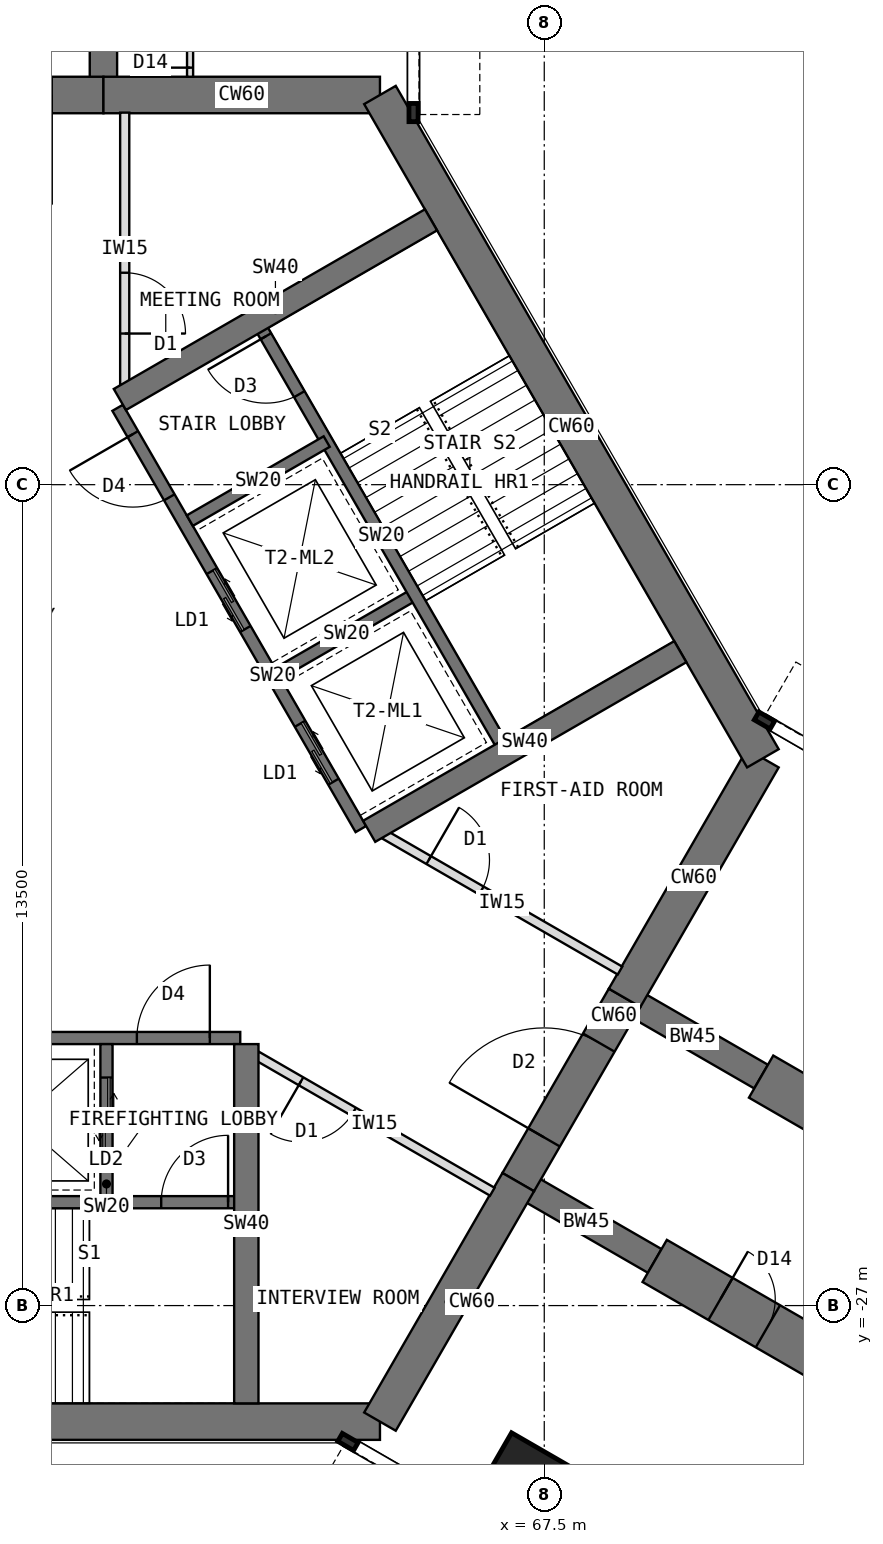
"""IFC4 building model, lengths in metres.
Left out: names, types, materials, properties, quantities, classifications, styles, units other than length and angle.
Written with IfcOpenShell. Run it as: python <this file> out.ifc"""

import sys

from ifc_helpers import new_model, si_unit, direction, frame, frame_2d, origin, origin_2d, place, context, subcontext, project, spatial, rectangle, extrude, element, fill, save


model = new_model("IFC4")
c1 = context("Model", 3, precision=1e-05, world=origin(), true_north=direction((0.0, 1.0)))
c2 = subcontext(c1, "Body", "Model", "MODEL_VIEW")
j1 = project(units=[si_unit("LENGTHUNIT", "METRE"), si_unit("PLANEANGLEUNIT", "RADIAN")], contexts=[c1])
p1 = place(None, origin())
s1 = spatial("IfcSite", under=j1, at=p1, CompositionType="ELEMENT")
p2 = place(p1, origin())
s2 = spatial("IfcBuilding", under=s1, at=p2, CompositionType="ELEMENT")
p3 = place(p2, frame((0.0, 0.0, 157.5)))
s3 = spatial("IfcBuildingStorey", under=s2, at=p3, CompositionType="ELEMENT", Elevation=157.5)
p4 = place(p3, frame((64.798, -7.092, 0.0), z_axis=(0.0, 0.0, 1.0), x_axis=(-1.0, 0.0, 0.0)))
e1 = element("IfcWall", 1, at=p4, inside=s3, PredefinedType="SHEAR", context=c2, shape_type="SweptSolid", body=[
    extrude(rectangle(XDim=4.548, YDim=0.6, at=frame_2d((2.274, 0.0))), origin(), (0.0, 0.0, 1.0), 4.0),
])
p5 = place(p3, frame((60.25, -7.092, 0.0), z_axis=(0.0, 0.0, 1.0), x_axis=(-1.0, 0.0, 0.0)))
e2 = element("IfcWall", 2, at=p5, inside=s3, PredefinedType="SHEAR", context=c2, shape_type="SweptSolid", body=[
    extrude(rectangle(XDim=3.5, YDim=0.6, at=frame_2d((1.75, 0.0))), origin(), (0.0, 0.0, 1.0), 4.0),
])
p6 = place(p5, frame((0.85, 0.0, 0.0)))
e3 = element("IfcOpeningElement", 3, at=p6, cuts=e2, PredefinedType="OPENING", context=c2, shape_type="SweptSolid", body=[
    extrude(rectangle(XDim=1.8, YDim=2.1, at=frame_2d((0.9, 1.05))), frame((0.0, 0.31, 0.0), z_axis=(0.0, -1.0, 0.0), x_axis=(1.0, 0.0, 0.0)), (0.0, 0.0, 1.0), 0.62),
])
p7 = place(p3, frame((52.202, -28.908, 0.0), z_axis=(0.0, 0.0, 1.0), x_axis=(1.0, 0.0, 0.0)))
e4 = element("IfcWall", 4, at=p7, inside=s3, PredefinedType="SHEAR", context=c2, shape_type="SweptSolid", body=[
    extrude(rectangle(XDim=12.596, YDim=0.6, at=frame_2d((6.298, 0.0))), origin(), (0.0, 0.0, 1.0), 4.0),
])
p8 = place(p3, frame((64.798, -28.908, 0.0), z_axis=(0.0, 0.0, 1.0), x_axis=(0.499984222037, 0.866034513004, 0.0)))
e5 = element("IfcWall", 5, at=p8, inside=s3, PredefinedType="SHEAR", context=c2, shape_type="SweptSolid", body=[
    extrude(rectangle(XDim=4.548, YDim=0.6, at=frame_2d((2.274, 0.0))), origin(), (0.0, 0.0, 1.0), 4.0),
])
p9 = place(p3, frame((67.072, -24.97, 0.0), z_axis=(0.0, 0.0, 1.0), x_axis=(0.500010275428, 0.866019471182, 0.0)))
e6 = element("IfcWall", 6, at=p9, inside=s3, PredefinedType="SHEAR", context=c2, shape_type="SweptSolid", body=[
    extrude(rectangle(XDim=3.5, YDim=0.6, at=frame_2d((1.75, 0.0))), origin(), (0.0, 0.0, 1.0), 4.0),
])
p10 = place(p9, frame((0.85, 0.0, 0.0)))
e7 = element("IfcOpeningElement", 7, at=p10, cuts=e6, PredefinedType="OPENING", context=c2, shape_type="SweptSolid", body=[
    extrude(rectangle(XDim=1.8, YDim=2.1, at=frame_2d((0.9, 1.05))), frame((0.0, 0.31, 0.0), z_axis=(0.0, -1.0, 0.0), x_axis=(1.0, 0.0, 0.0)), (0.0, 0.0, 1.0), 0.62),
])
p11 = place(p3, frame((68.822, -21.939, 0.0), z_axis=(0.0, 0.0, 1.0), x_axis=(0.500024481964, 0.866011268655, 0.0)))
e8 = element("IfcWall", 8, at=p11, inside=s3, PredefinedType="SHEAR", context=c2, shape_type="SweptSolid", body=[
    extrude(rectangle(XDim=4.548, YDim=0.6, at=frame_2d((2.274, 0.0))), origin(), (0.0, 0.0, 1.0), 4.0),
])
p12 = place(p3, frame((71.096, -18.0, 0.0), z_axis=(0.0, 0.0, 1.0), x_axis=(-0.500005998175, 0.866021940709, 0.0)))
e9 = element("IfcWall", 9, at=p12, inside=s3, PredefinedType="SHEAR", context=c2, shape_type="SweptSolid", body=[
    extrude(rectangle(XDim=12.596, YDim=0.6, at=frame_2d((6.298, 0.0))), origin(), (0.0, 0.0, 1.0), 4.0),
])
p13 = place(p3, frame((60.25, -7.092, 0.0), z_axis=(0.0, 0.0, 1.0), x_axis=(0.0, 1.0, 0.0)))
e10 = element("IfcWall", 10, at=p13, inside=s3, PredefinedType="SHEAR", context=c2, shape_type="SweptSolid", body=[
    extrude(rectangle(XDim=2.592, YDim=0.45, at=frame_2d((1.296, 0.0))), origin(), (0.0, 0.0, 1.0), 4.0),
])
p14 = place(p3, frame((68.822, -21.939, 0.0), z_axis=(0.0, 0.0, 1.0), x_axis=(0.866072649678, -0.499918158782, 0.0)))
e11 = element("IfcWall", 11, at=p14, inside=s3, PredefinedType="SHEAR", context=c2, shape_type="SweptSolid", body=[
    extrude(rectangle(XDim=2.592, YDim=0.45, at=frame_2d((1.296, 0.0))), origin(), (0.0, 0.0, 1.0), 4.0),
])
p15 = place(p3, frame((71.066, -23.234, 0.0), z_axis=(0.0, 0.0, 1.0), x_axis=(0.86602681393, -0.499997557548, 0.0)))
e12 = element("IfcWall", 12, at=p15, inside=s3, PredefinedType="SHEAR", context=c2, shape_type="SweptSolid", body=[
    extrude(rectangle(XDim=9.5, YDim=0.8, at=frame_2d((4.75, 0.0))), origin(), (0.0, 0.0, 1.0), 4.0),
])
p16 = place(p15, frame((1.25, 0.0, 0.0)))
e13 = element("IfcOpeningElement", 13, at=p16, cuts=e12, PredefinedType="OPENING", context=c2, shape_type="SweptSolid", body=[
    extrude(rectangle(XDim=0.9, YDim=2.1, at=frame_2d((0.45, 1.05))), frame((0.0, 0.41, 0.0), z_axis=(0.0, -1.0, 0.0), x_axis=(1.0, 0.0, 0.0)), (0.0, 0.0, 1.0), 0.82),
])
p17 = place(p3, frame((67.072, -24.97, 0.0), z_axis=(0.0, 0.0, 1.0), x_axis=(0.866031863473, -0.499988811324, 0.0)))
e14 = element("IfcWall", 14, at=p17, inside=s3, PredefinedType="SHEAR", context=c2, shape_type="SweptSolid", body=[
    extrude(rectangle(XDim=2.592, YDim=0.45, at=frame_2d((1.296, 0.0))), origin(), (0.0, 0.0, 1.0), 4.0),
])
p18 = place(p3, frame((69.316, -26.266, 0.0), z_axis=(0.0, 0.0, 1.0), x_axis=(0.86602681393, -0.499997557548, 0.0)))
e15 = element("IfcWall", 15, at=p18, inside=s3, PredefinedType="SHEAR", context=c2, shape_type="SweptSolid", body=[
    extrude(rectangle(XDim=9.5, YDim=0.8, at=frame_2d((4.75, 0.0))), origin(), (0.0, 0.0, 1.0), 4.0),
])
p19 = place(p18, frame((1.25, 0.0, 0.0)))
e16 = element("IfcOpeningElement", 16, at=p19, cuts=e15, PredefinedType="OPENING", context=c2, shape_type="SweptSolid", body=[
    extrude(rectangle(XDim=0.9, YDim=2.1, at=frame_2d((0.45, 1.05))), frame((0.0, 0.41, 0.0), z_axis=(0.0, -1.0, 0.0), x_axis=(1.0, 0.0, 0.0)), (0.0, 0.0, 1.0), 0.82),
])
p20 = place(p3, frame((67.191, -29.946, 0.0), z_axis=(0.0, 0.0, 1.0), x_axis=(0.5, 0.866025403784, 0.0)))
e17 = element("IfcColumn", 17, at=p20, inside=s3, PredefinedType="COLUMN", context=c2, shape_type="SweptSolid", body=[
    extrude(rectangle(XDim=1.25, YDim=1.25, at=origin_2d()), origin(), (0.0, 0.0, 1.0), 4.0),
])
p21 = place(p3, frame((54.5, -22.6, 0.0), z_axis=(0.0, 0.0, 1.0), x_axis=(1.0, 0.0, 0.0)))
e18 = element("IfcWall", 18, at=p21, inside=s3, PredefinedType="SHEAR", context=c2, shape_type="SweptSolid", body=[
    extrude(rectangle(XDim=8.0, YDim=0.2, at=frame_2d((4.0, 0.0))), origin(), (0.0, 0.0, 1.0), 4.0),
])
p22 = place(p21, frame((6.3, 0.0, 0.0)))
e19 = element("IfcOpeningElement", 19, at=p22, cuts=e18, PredefinedType="OPENING", context=c2, shape_type="SweptSolid", body=[
    extrude(rectangle(XDim=1.2, YDim=2.1, at=frame_2d((0.6, 1.05))), frame((0.0, 0.11, 0.0), z_axis=(0.0, -1.0, 0.0), x_axis=(1.0, 0.0, 0.0)), (0.0, 0.0, 1.0), 0.22),
])
p23 = place(p21, frame((0.9, 0.0, 0.0)))
e20 = element("IfcOpeningElement", 20, at=p23, cuts=e18, PredefinedType="OPENING", context=c2, shape_type="SweptSolid", body=[
    extrude(rectangle(XDim=1.1, YDim=2.2, at=frame_2d((0.55, 1.1))), frame((0.0, 0.11, 0.0), z_axis=(0.0, -1.0, 0.0), x_axis=(1.0, 0.0, 0.0)), (0.0, 0.0, 1.0), 0.22),
])
p24 = place(p3, frame((60.3, -22.7, 0.0), z_axis=(0.0, 0.0, 1.0), x_axis=(0.0, -1.0, 0.0)))
e21 = element("IfcWall", 21, at=p24, inside=s3, PredefinedType="SHEAR", context=c2, shape_type="SweptSolid", body=[
    extrude(rectangle(XDim=2.6, YDim=0.2, at=frame_2d((1.3, 0.0))), origin(), (0.0, 0.0, 1.0), 4.0),
])
p25 = place(p24, frame((0.55, 0.0, 0.0)))
e22 = element("IfcOpeningElement", 22, at=p25, cuts=e21, PredefinedType="OPENING", context=c2, shape_type="SweptSolid", body=[
    extrude(rectangle(XDim=1.3, YDim=2.2, at=frame_2d((0.65, 1.1))), frame((0.0, 0.11, 0.0), z_axis=(0.0, -1.0, 0.0), x_axis=(1.0, 0.0, 0.0)), (0.0, 0.0, 1.0), 0.22),
])
p26 = place(p3, frame((54.5, -25.3, 0.0), z_axis=(0.0, 0.0, 1.0), x_axis=(1.0, 0.0, 0.0)))
e23 = element("IfcWall", 23, at=p26, inside=s3, PredefinedType="SHEAR", context=c2, shape_type="SweptSolid", body=[
    extrude(rectangle(XDim=8.0, YDim=0.2, at=frame_2d((4.0, 0.0))), origin(), (0.0, 0.0, 1.0), 4.0),
])
p27 = place(p26, frame((6.7, 0.0, 0.0)))
e24 = element("IfcOpeningElement", 24, at=p27, cuts=e23, PredefinedType="OPENING", context=c2, shape_type="SweptSolid", body=[
    extrude(rectangle(XDim=1.1, YDim=2.1, at=frame_2d((0.55, 1.05))), frame((0.0, 0.11, 0.0), z_axis=(0.0, -1.0, 0.0), x_axis=(1.0, 0.0, 0.0)), (0.0, 0.0, 1.0), 0.22),
])
p28 = place(p3, frame((62.6, -22.7, 0.0), z_axis=(0.0, 0.0, 1.0), x_axis=(0.0, -1.0, 0.0)))
e25 = element("IfcWall", 25, at=p28, inside=s3, PredefinedType="SHEAR", context=c2, shape_type="SweptSolid", body=[
    extrude(rectangle(XDim=5.908, YDim=0.4, at=frame_2d((2.954, 0.0))), origin(), (0.0, 0.0, 1.0), 4.0),
])
p29 = place(p3, frame((64.484, -19.164, 0.0), z_axis=(0.0, 0.0, 1.0), x_axis=(-0.49999894854, 0.866026010844, 0.0)))
e26 = element("IfcWall", 26, at=p29, inside=s3, PredefinedType="SHEAR", context=c2, shape_type="SweptSolid", body=[
    extrude(rectangle(XDim=8.0, YDim=0.2, at=frame_2d((4.0, 0.0))), origin(), (0.0, 0.0, 1.0), 4.0),
])
p30 = place(p29, frame((6.3, 0.0, 0.0)))
e27 = element("IfcOpeningElement", 27, at=p30, cuts=e26, PredefinedType="OPENING", context=c2, shape_type="SweptSolid", body=[
    extrude(rectangle(XDim=1.2, YDim=2.1, at=frame_2d((0.6, 1.05))), frame((0.0, 0.11, 0.0), z_axis=(0.0, -1.0, 0.0), x_axis=(1.0, 0.0, 0.0)), (0.0, 0.0, 1.0), 0.22),
])
p31 = place(p29, frame((0.9, 0.0, 0.0)))
e28 = element("IfcOpeningElement", 28, at=p31, cuts=e26, PredefinedType="OPENING", context=c2, shape_type="SweptSolid", body=[
    extrude(rectangle(XDim=1.1, YDim=2.2, at=frame_2d((0.55, 1.1))), frame((0.0, 0.11, 0.0), z_axis=(0.0, -1.0, 0.0), x_axis=(1.0, 0.0, 0.0)), (0.0, 0.0, 1.0), 0.22),
])
p32 = place(p29, frame((3.8, 0.0, 0.0)))
e29 = element("IfcOpeningElement", 29, at=p32, cuts=e26, PredefinedType="OPENING", context=c2, shape_type="SweptSolid", body=[
    extrude(rectangle(XDim=1.1, YDim=2.2, at=frame_2d((0.55, 1.1))), frame((0.0, 0.11, 0.0), z_axis=(0.0, -1.0, 0.0), x_axis=(1.0, 0.0, 0.0)), (0.0, 0.0, 1.0), 0.22),
])
p33 = place(p3, frame((63.12, -16.603, 0.0), z_axis=(0.0, 0.0, 1.0), x_axis=(0.866062058628, 0.499936506574, 0.0)))
e30 = element("IfcWall", 30, at=p33, inside=s3, PredefinedType="SHEAR", context=c2, shape_type="SweptSolid", body=[
    extrude(rectangle(XDim=2.6, YDim=0.2, at=frame_2d((1.3, 0.0))), origin(), (0.0, 0.0, 1.0), 4.0),
])
p34 = place(p3, frame((61.67, -14.091, 0.0), z_axis=(0.0, 0.0, 1.0), x_axis=(0.86603858612, 0.49997716683, 0.0)))
e31 = element("IfcWall", 31, at=p34, inside=s3, PredefinedType="SHEAR", context=c2, shape_type="SweptSolid", body=[
    extrude(rectangle(XDim=2.6, YDim=0.2, at=frame_2d((1.3, 0.0))), origin(), (0.0, 0.0, 1.0), 4.0),
])
p35 = place(p3, frame((66.822, -17.814, 0.0), z_axis=(0.0, 0.0, 1.0), x_axis=(-0.49999894854, 0.866026010844, 0.0)))
e32 = element("IfcWall", 32, at=p35, inside=s3, PredefinedType="SHEAR", context=c2, shape_type="SweptSolid", body=[
    extrude(rectangle(XDim=8.0, YDim=0.2, at=frame_2d((4.0, 0.0))), origin(), (0.0, 0.0, 1.0), 4.0),
])
p36 = place(p35, frame((6.7, 0.0, 0.0)))
e33 = element("IfcOpeningElement", 33, at=p36, cuts=e32, PredefinedType="OPENING", context=c2, shape_type="SweptSolid", body=[
    extrude(rectangle(XDim=1.1, YDim=2.1, at=frame_2d((0.55, 1.05))), frame((0.0, 0.11, 0.0), z_axis=(0.0, -1.0, 0.0), x_axis=(1.0, 0.0, 0.0)), (0.0, 0.0, 1.0), 0.22),
])
p37 = place(p3, frame((60.52, -12.099, 0.0), z_axis=(0.0, 0.0, 1.0), x_axis=(0.866009424208, 0.500027676417, 0.0)))
e34 = element("IfcWall", 34, at=p37, inside=s3, PredefinedType="SHEAR", context=c2, shape_type="SweptSolid", body=[
    extrude(rectangle(XDim=5.908, YDim=0.4, at=frame_2d((2.954, 0.0))), origin(), (0.0, 0.0, 1.0), 4.0),
])
p38 = place(p3, frame((64.62, -19.201, 0.0), z_axis=(0.0, 0.0, 1.0), x_axis=(0.866027317282, 0.49999668571, 0.0)))
e35 = element("IfcWall", 35, at=p38, inside=s3, PredefinedType="SHEAR", context=c2, shape_type="SweptSolid", body=[
    extrude(rectangle(XDim=5.908, YDim=0.4, at=frame_2d((2.954, 0.0))), origin(), (0.0, 0.0, 1.0), 4.0),
])
p39 = place(p3, frame((61.675, -6.792, 0.0), z_axis=(0.0, 0.0, 1.0), x_axis=(0.0, 1.0, 0.0)))
e36 = element("IfcWall", 36, at=p39, inside=s3, PredefinedType="PARTITIONING", context=c2, shape_type="SweptSolid", body=[
    extrude(rectangle(XDim=2.4, YDim=0.1, at=frame_2d((1.2, 0.0))), origin(), (0.0, 0.0, 1.0), 3.8),
])
p40 = place(p39, frame((0.15, 0.0, 0.0)))
e37 = element("IfcOpeningElement", 37, at=p40, cuts=e36, PredefinedType="OPENING", context=c2, shape_type="SweptSolid", body=[
    extrude(rectangle(XDim=0.9, YDim=2.1, at=frame_2d((0.45, 1.05))), frame((0.0, 0.06, 0.0), z_axis=(0.0, -1.0, 0.0), x_axis=(1.0, 0.0, 0.0)), (0.0, 0.0, 1.0), 0.12),
])
p41 = place(p3, frame((60.6, -7.382, 0.0), z_axis=(0.0, 0.0, 1.0), x_axis=(0.0, -1.0, 0.0)))
e38 = element("IfcWall", 38, at=p41, inside=s3, PredefinedType="PARTITIONING", context=c2, shape_type="SweptSolid", body=[
    extrude(rectangle(XDim=4.476, YDim=0.15, at=frame_2d((2.238, 0.0))), origin(), (0.0, 0.0, 1.0), 3.8),
])
p42 = place(p41, frame((2.633, 0.0, 0.0)))
e39 = element("IfcOpeningElement", 39, at=p42, cuts=e38, PredefinedType="OPENING", context=c2, shape_type="SweptSolid", body=[
    extrude(rectangle(XDim=1.0, YDim=2.1, at=frame_2d((0.5, 1.05))), frame((0.0, 0.085, 0.0), z_axis=(0.0, -1.0, 0.0), x_axis=(1.0, 0.0, 0.0)), (0.0, 0.0, 1.0), 0.17),
])
p43 = place(p3, frame((64.87, -19.253, 0.0), z_axis=(0.0, 0.0, 1.0), x_axis=(0.866025707867, -0.499999473313, 0.0)))
e40 = element("IfcWall", 40, at=p43, inside=s3, PredefinedType="PARTITIONING", context=c2, shape_type="SweptSolid", body=[
    extrude(rectangle(XDim=4.476, YDim=0.15, at=frame_2d((2.238, 0.0))), origin(), (0.0, 0.0, 1.0), 3.8),
])
p44 = place(p43, frame((0.843, 0.0, 0.0)))
e41 = element("IfcOpeningElement", 41, at=p44, cuts=e40, PredefinedType="OPENING", context=c2, shape_type="SweptSolid", body=[
    extrude(rectangle(XDim=1.0, YDim=2.1, at=frame_2d((0.5, 1.05))), frame((0.0, 0.085, 0.0), z_axis=(0.0, -1.0, 0.0), x_axis=(1.0, 0.0, 0.0)), (0.0, 0.0, 1.0), 0.17),
])
p45 = place(p3, frame((66.646, -25.128, 0.0), z_axis=(0.0, 0.0, 1.0), x_axis=(-0.866025707867, 0.499999473313, 0.0)))
e42 = element("IfcWall", 42, at=p45, inside=s3, PredefinedType="PARTITIONING", context=c2, shape_type="SweptSolid", body=[
    extrude(rectangle(XDim=4.476, YDim=0.15, at=frame_2d((2.238, 0.0))), origin(), (0.0, 0.0, 1.0), 3.8),
])
p46 = place(p45, frame((2.633, 0.0, 0.0)))
e43 = element("IfcOpeningElement", 43, at=p46, cuts=e42, PredefinedType="OPENING", context=c2, shape_type="SweptSolid", body=[
    extrude(rectangle(XDim=1.0, YDim=2.1, at=frame_2d((0.5, 1.05))), frame((0.0, 0.085, 0.0), z_axis=(0.0, -1.0, 0.0), x_axis=(1.0, 0.0, 0.0)), (0.0, 0.0, 1.0), 0.17),
])
p47 = place(p22, origin())
e44 = element("IfcDoor", 44, at=p47, inside=s3, OperationType="SINGLE_SWING_RIGHT", PredefinedType="DOOR", context=c2, shape_type="SweptSolid", body=[
    extrude(rectangle(XDim=1.2, YDim=2.1, at=frame_2d((0.6, 1.05))), frame((0.0, 0.025, 0.0), z_axis=(0.0, -1.0, 0.0), x_axis=(1.0, 0.0, 0.0)), (0.0, 0.0, 1.0), 0.05),
])
fill(e19, e44)
p48 = place(p25, origin())
e45 = element("IfcDoor", 45, at=p48, inside=s3, OperationType="DOUBLE_DOOR_SLIDING", PredefinedType="DOOR", context=c2, shape_type="SweptSolid", body=[
    extrude(rectangle(XDim=1.3, YDim=2.2, at=frame_2d((0.65, 1.1))), frame((0.0, 0.025, 0.0), z_axis=(0.0, -1.0, 0.0), x_axis=(1.0, 0.0, 0.0)), (0.0, 0.0, 1.0), 0.05),
])
fill(e22, e45)
p49 = place(p27, origin())
e46 = element("IfcDoor", 46, at=p49, inside=s3, OperationType="SINGLE_SWING_RIGHT", PredefinedType="DOOR", context=c2, shape_type="SweptSolid", body=[
    extrude(rectangle(XDim=1.1, YDim=2.1, at=frame_2d((0.55, 1.05))), frame((0.0, 0.025, 0.0), z_axis=(0.0, -1.0, 0.0), x_axis=(1.0, 0.0, 0.0)), (0.0, 0.0, 1.0), 0.05),
])
fill(e24, e46)
p50 = place(p30, origin())
e47 = element("IfcDoor", 47, at=p50, inside=s3, OperationType="SINGLE_SWING_RIGHT", PredefinedType="DOOR", context=c2, shape_type="SweptSolid", body=[
    extrude(rectangle(XDim=1.2, YDim=2.1, at=frame_2d((0.6, 1.05))), frame((0.0, 0.025, 0.0), z_axis=(0.0, -1.0, 0.0), x_axis=(1.0, 0.0, 0.0)), (0.0, 0.0, 1.0), 0.05),
])
fill(e27, e47)
p51 = place(p31, origin())
e48 = element("IfcDoor", 48, at=p51, inside=s3, OperationType="DOUBLE_DOOR_SLIDING", PredefinedType="DOOR", context=c2, shape_type="SweptSolid", body=[
    extrude(rectangle(XDim=1.1, YDim=2.2, at=frame_2d((0.55, 1.1))), frame((0.0, 0.025, 0.0), z_axis=(0.0, -1.0, 0.0), x_axis=(1.0, 0.0, 0.0)), (0.0, 0.0, 1.0), 0.05),
])
fill(e28, e48)
p52 = place(p32, origin())
e49 = element("IfcDoor", 49, at=p52, inside=s3, OperationType="DOUBLE_DOOR_SLIDING", PredefinedType="DOOR", context=c2, shape_type="SweptSolid", body=[
    extrude(rectangle(XDim=1.1, YDim=2.2, at=frame_2d((0.55, 1.1))), frame((0.0, 0.025, 0.0), z_axis=(0.0, -1.0, 0.0), x_axis=(1.0, 0.0, 0.0)), (0.0, 0.0, 1.0), 0.05),
])
fill(e29, e49)
p53 = place(p36, origin())
e50 = element("IfcDoor", 50, at=p53, inside=s3, OperationType="SINGLE_SWING_RIGHT", PredefinedType="DOOR", context=c2, shape_type="SweptSolid", body=[
    extrude(rectangle(XDim=1.1, YDim=2.1, at=frame_2d((0.55, 1.05))), frame((0.0, 0.025, 0.0), z_axis=(0.0, -1.0, 0.0), x_axis=(1.0, 0.0, 0.0)), (0.0, 0.0, 1.0), 0.05),
])
fill(e33, e50)
p54 = place(p10, origin())
e51 = element("IfcDoor", 51, at=p54, inside=s3, OperationType="DOUBLE_DOOR_DOUBLE_SWING", PredefinedType="DOOR", context=c2, shape_type="SweptSolid", body=[
    extrude(rectangle(XDim=1.72, YDim=2.06, at=frame_2d((0.9, 1.03))), frame((0.0, 0.025, 0.0), z_axis=(0.0, -1.0, 0.0), x_axis=(1.0, 0.0, 0.0)), (0.0, 0.0, 1.0), 0.05),
    extrude(rectangle(XDim=0.04, YDim=2.1, at=frame_2d((0.02, 1.05))), frame((0.0, 0.3, 0.0), z_axis=(0.0, -1.0, 0.0), x_axis=(1.0, 0.0, 0.0)), (0.0, 0.0, 1.0), 0.6),
    extrude(rectangle(XDim=0.04, YDim=2.1, at=frame_2d((1.78, 1.05))), frame((0.0, 0.3, 0.0), z_axis=(0.0, -1.0, 0.0), x_axis=(1.0, 0.0, 0.0)), (0.0, 0.0, 1.0), 0.6),
    extrude(rectangle(XDim=1.72, YDim=0.04, at=frame_2d((0.9, 2.08))), frame((0.0, 0.3, 0.0), z_axis=(0.0, -1.0, 0.0), x_axis=(1.0, 0.0, 0.0)), (0.0, 0.0, 1.0), 0.6),
])
fill(e7, e51)
p55 = place(p40, origin())
e52 = element("IfcDoor", 52, at=p55, inside=s3, OperationType="SINGLE_SWING_LEFT", PredefinedType="DOOR", context=c2, shape_type="SweptSolid", body=[
    extrude(rectangle(XDim=0.9, YDim=2.1, at=frame_2d((0.45, 1.05))), frame((0.0, 0.025, 0.0), z_axis=(0.0, -1.0, 0.0), x_axis=(1.0, 0.0, 0.0)), (0.0, 0.0, 1.0), 0.05),
])
fill(e37, e52)
p56 = place(p46, origin())
e53 = element("IfcDoor", 53, at=p56, inside=s3, OperationType="SINGLE_SWING_RIGHT", PredefinedType="DOOR", context=c2, shape_type="SweptSolid", body=[
    extrude(rectangle(XDim=1.0, YDim=2.1, at=frame_2d((0.5, 1.05))), frame((0.0, 0.025, 0.0), z_axis=(0.0, -1.0, 0.0), x_axis=(1.0, 0.0, 0.0)), (0.0, 0.0, 1.0), 0.05),
])
fill(e43, e53)
p57 = place(p44, origin())
e54 = element("IfcDoor", 54, at=p57, inside=s3, OperationType="SINGLE_SWING_LEFT", PredefinedType="DOOR", context=c2, shape_type="SweptSolid", body=[
    extrude(rectangle(XDim=1.0, YDim=2.1, at=frame_2d((0.5, 1.05))), frame((0.0, 0.025, 0.0), z_axis=(0.0, -1.0, 0.0), x_axis=(1.0, 0.0, 0.0)), (0.0, 0.0, 1.0), 0.05),
])
fill(e41, e54)
p58 = place(p42, origin())
e55 = element("IfcDoor", 55, at=p58, inside=s3, OperationType="SINGLE_SWING_RIGHT", PredefinedType="DOOR", context=c2, shape_type="SweptSolid", body=[
    extrude(rectangle(XDim=1.0, YDim=2.1, at=frame_2d((0.5, 1.05))), frame((0.0, 0.025, 0.0), z_axis=(0.0, -1.0, 0.0), x_axis=(1.0, 0.0, 0.0)), (0.0, 0.0, 1.0), 0.05),
])
fill(e39, e55)
p59 = place(p19, origin())
e56 = element("IfcDoor", 56, at=p59, inside=s3, OperationType="SINGLE_SWING_LEFT", PredefinedType="DOOR", context=c2, shape_type="SweptSolid", body=[
    extrude(rectangle(XDim=0.82, YDim=2.06, at=frame_2d((0.45, 1.03))), frame((0.0, 0.025, 0.0), z_axis=(0.0, -1.0, 0.0), x_axis=(1.0, 0.0, 0.0)), (0.0, 0.0, 1.0), 0.05),
    extrude(rectangle(XDim=0.04, YDim=2.1, at=frame_2d((0.02, 1.05))), frame((0.0, 0.4, 0.0), z_axis=(0.0, -1.0, 0.0), x_axis=(1.0, 0.0, 0.0)), (0.0, 0.0, 1.0), 0.8),
    extrude(rectangle(XDim=0.04, YDim=2.1, at=frame_2d((0.88, 1.05))), frame((0.0, 0.4, 0.0), z_axis=(0.0, -1.0, 0.0), x_axis=(1.0, 0.0, 0.0)), (0.0, 0.0, 1.0), 0.8),
    extrude(rectangle(XDim=0.82, YDim=0.04, at=frame_2d((0.45, 2.08))), frame((0.0, 0.4, 0.0), z_axis=(0.0, -1.0, 0.0), x_axis=(1.0, 0.0, 0.0)), (0.0, 0.0, 1.0), 0.8),
])
fill(e16, e56)
save(model, sys.argv[1])
